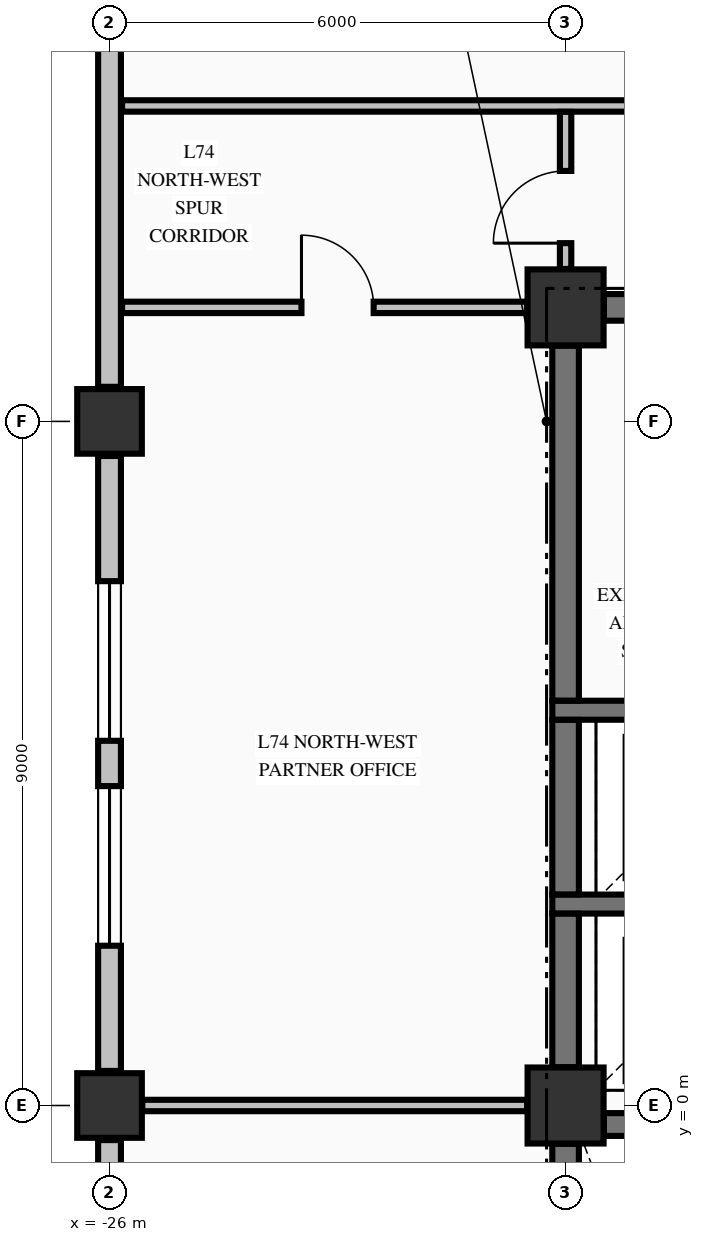
"""IFC4 building model, lengths in metres.
Left out: names, types, materials, properties, quantities, classifications, styles, units other than length and angle.
Written with IfcOpenShell. Run it as: python <this file> out.ifc"""

import sys

from ifc_helpers import new_model, si_unit, direction, frame, frame_2d, origin, origin_2d, place, context, subcontext, project, spatial, rectangle, extrude, element, fill, save


model = new_model("IFC4")
c1 = context("Model", 3, precision=1e-05, world=origin(), true_north=direction((0.0, 1.0)))
c2 = subcontext(c1, "Body", "Model", "MODEL_VIEW")
j1 = project(units=[si_unit("LENGTHUNIT", "METRE"), si_unit("PLANEANGLEUNIT", "RADIAN")], contexts=[c1])
p1 = place(None, origin())
s1 = spatial("IfcSite", under=j1, at=p1, CompositionType="ELEMENT")
p2 = place(p1, origin())
s2 = spatial("IfcBuilding", under=s1, at=p2, CompositionType="ELEMENT")
p3 = place(p2, frame((0.0, 0.0, 278.06)))
s3 = spatial("IfcBuildingStorey", under=s2, at=p3, CompositionType="ELEMENT", Elevation=278.06)
for number, where, z_axis, x_axis in (
    (1, (-26.0, 0.0, -0.425), (0.0, 0.0, 1.0), (1.0, 0.0, 0.0)),
    (2, (-26.0, 9.0, -0.425), (0.0, 0.0, 1.0), (1.0, 0.0, 0.0)),
):
    element("IfcColumn", number, at=place(p3, frame(where, z_axis=z_axis, x_axis=x_axis)), inside=s3, PredefinedType="COLUMN", context=c2, shape_type="SweptSolid", body=[
        extrude(rectangle(XDim=0.85, YDim=0.85, at=origin_2d()), origin(), (0.0, 0.0, 1.0), 3.84),
    ])
for number, where, z_axis, x_axis in (
    (3, (-20.0, 10.5, -0.425), (0.0, 0.0, 1.0), (1.0, 0.0, 0.0)),
    (4, (-20.0, 0.0, -0.425), (0.0, 0.0, 1.0), (1.0, 0.0, 0.0)),
):
    element("IfcColumn", number, at=place(p3, frame(where, z_axis=z_axis, x_axis=x_axis)), inside=s3, PredefinedType="COLUMN", context=c2, shape_type="SweptSolid", body=[
        extrude(rectangle(XDim=1.0, YDim=1.0, at=origin_2d()), origin(), (0.0, 0.0, 1.0), 3.84),
    ])
p4 = place(p3, frame((-26.0, -0.455, 0.0), z_axis=(0.0, 0.0, 1.0), x_axis=(0.0, -1.0, 0.0)))
e5 = element("IfcWall", 5, at=p4, inside=s3, PredefinedType="STANDARD", context=c2, shape_type="SweptSolid", body=[
    extrude(rectangle(XDim=8.09, YDim=0.3, at=frame_2d((4.045, 0.0))), origin(), (0.0, 0.0, 1.0), 2.807),
])
p5 = place(p4, frame((1.647, 0.0, 0.7)))
e6 = element("IfcOpeningElement", 6, at=p5, cuts=e5, PredefinedType="OPENING", context=c2, shape_type="SweptSolid", body=[
    extrude(rectangle(XDim=2.1, YDim=1.5, at=frame_2d((1.05, 0.75))), frame((0.0, 0.16, 0.0), z_axis=(0.0, -1.0, 0.0), x_axis=(1.0, 0.0, 0.0)), (0.0, 0.0, 1.0), 0.32),
])
p6 = place(p4, frame((4.343, 0.0, 0.7)))
e7 = element("IfcOpeningElement", 7, at=p6, cuts=e5, PredefinedType="OPENING", context=c2, shape_type="SweptSolid", body=[
    extrude(rectangle(XDim=2.1, YDim=1.5, at=frame_2d((1.05, 0.75))), frame((0.0, 0.16, 0.0), z_axis=(0.0, -1.0, 0.0), x_axis=(1.0, 0.0, 0.0)), (0.0, 0.0, 1.0), 0.32),
])
p7 = place(p3, frame((-26.0, 8.545, 0.0), z_axis=(0.0, 0.0, 1.0), x_axis=(0.0, -1.0, 0.0)))
e8 = element("IfcWall", 8, at=p7, inside=s3, PredefinedType="STANDARD", context=c2, shape_type="SweptSolid", body=[
    extrude(rectangle(XDim=8.09, YDim=0.3, at=frame_2d((4.045, 0.0))), origin(), (0.0, 0.0, 1.0), 2.807),
])
p8 = place(p7, frame((1.647, 0.0, 0.7)))
e9 = element("IfcOpeningElement", 9, at=p8, cuts=e8, PredefinedType="OPENING", context=c2, shape_type="SweptSolid", body=[
    extrude(rectangle(XDim=2.1, YDim=1.5, at=frame_2d((1.05, 0.75))), frame((0.0, 0.16, 0.0), z_axis=(0.0, -1.0, 0.0), x_axis=(1.0, 0.0, 0.0)), (0.0, 0.0, 1.0), 0.32),
])
p9 = place(p7, frame((4.343, 0.0, 0.7)))
e10 = element("IfcOpeningElement", 10, at=p9, cuts=e8, PredefinedType="OPENING", context=c2, shape_type="SweptSolid", body=[
    extrude(rectangle(XDim=2.1, YDim=1.5, at=frame_2d((1.05, 0.75))), frame((0.0, 0.16, 0.0), z_axis=(0.0, -1.0, 0.0), x_axis=(1.0, 0.0, 0.0)), (0.0, 0.0, 1.0), 0.32),
])
p10 = place(p3, frame((-26.0, 17.545, 0.0), z_axis=(0.0, 0.0, 1.0), x_axis=(0.0, -1.0, 0.0)))
e11 = element("IfcWall", 11, at=p10, inside=s3, PredefinedType="STANDARD", context=c2, shape_type="SweptSolid", body=[
    extrude(rectangle(XDim=8.09, YDim=0.3, at=frame_2d((4.045, 0.0))), origin(), (0.0, 0.0, 1.0), 1.607),
])
p11 = place(p3, frame((-19.496, -0.25, 0.0), z_axis=(0.0, 0.0, 1.0), x_axis=(1.0, 0.0, 0.0)))
e12 = element("IfcWall", 12, at=p11, inside=s3, PredefinedType="SHEAR", context=c2, shape_type="SweptSolid", body=[
    extrude(rectangle(XDim=7.992, YDim=0.3, at=frame_2d((3.996, 0.0))), origin(), (0.0, 0.0, 1.0), 3.415),
])
p12 = place(p11, frame((5.796, 0.0, 0.0)))
e13 = element("IfcOpeningElement", 13, at=p12, cuts=e12, PredefinedType="OPENING", context=c2, shape_type="SweptSolid", body=[
    extrude(rectangle(XDim=1.1, YDim=2.15, at=frame_2d((0.55, 1.075))), frame((0.0, 0.16, 0.0), z_axis=(0.0, -1.0, 0.0), x_axis=(1.0, 0.0, 0.0)), (0.0, 0.0, 1.0), 0.32),
])
for number, where, z_axis, x_axis in (
    (14, (-20.175, 2.65, 0.0), (0.0, 0.0, 1.0), (1.0, 0.0, 0.0)),
    (15, (-20.175, 5.2, 0.0), (0.0, 0.0, 1.0), (1.0, 0.0, 0.0)),
):
    element("IfcWall", number, at=place(p3, frame(where, z_axis=z_axis, x_axis=x_axis)), inside=s3, PredefinedType="SOLIDWALL", context=c2, shape_type="SweptSolid", body=[
        extrude(rectangle(XDim=3.2, YDim=0.25, at=frame_2d((1.6, 0.0))), origin(), (0.0, 0.0, 1.0), 3.415),
    ])
p13 = place(p3, frame((-19.496, 10.5, 0.0), z_axis=(0.0, 0.0, 1.0), x_axis=(1.0, 0.0, 0.0)))
e16 = element("IfcWall", 16, at=p13, inside=s3, PredefinedType="SHEAR", context=c2, shape_type="SweptSolid", body=[
    extrude(rectangle(XDim=4.796, YDim=0.35, at=frame_2d((2.398, 0.0))), origin(), (0.0, 0.0, 1.0), 3.415),
])
p14 = place(p13, frame((3.046, 0.0, 0.0)))
e17 = element("IfcOpeningElement", 17, at=p14, cuts=e16, PredefinedType="OPENING", context=c2, shape_type="SweptSolid", body=[
    extrude(rectangle(XDim=1.1, YDim=2.15, at=frame_2d((0.55, 1.075))), frame((0.0, 0.185, 0.0), z_axis=(0.0, -1.0, 0.0), x_axis=(1.0, 0.0, 0.0)), (0.0, 0.0, 1.0), 0.37),
])
p15 = place(p3, frame((-25.569, 0.0, 0.0), z_axis=(0.0, 0.0, 1.0), x_axis=(1.0, 0.0, 0.0)))
e18 = element("IfcWall", 18, at=p15, inside=s3, PredefinedType="PARTITIONING", context=c2, shape_type="SweptSolid", body=[
    extrude(rectangle(XDim=5.063, YDim=0.15, at=frame_2d((2.531, 0.0))), origin(), (0.0, 0.0, 1.0), 3.005),
])
p16 = place(p3, frame((-25.835, 10.5, 0.0), z_axis=(0.0, 0.0, 1.0), x_axis=(1.0, 0.0, 0.0)))
e19 = element("IfcWall", 19, at=p16, inside=s3, PredefinedType="PARTITIONING", context=c2, shape_type="SweptSolid", body=[
    extrude(rectangle(XDim=5.329, YDim=0.15, at=frame_2d((2.665, 0.0))), origin(), (0.0, 0.0, 1.0), 3.415),
])
p17 = place(p16, frame((2.36, 0.0, 0.0)))
e20 = element("IfcOpeningElement", 20, at=p17, cuts=e19, PredefinedType="OPENING", context=c2, shape_type="SweptSolid", body=[
    extrude(rectangle(XDim=0.95, YDim=2.15, at=frame_2d((0.475, 1.075))), frame((0.0, 0.085, 0.0), z_axis=(0.0, -1.0, 0.0), x_axis=(1.0, 0.0, 0.0)), (0.0, 0.0, 1.0), 0.17),
])
p18 = place(p3, frame((-25.835, 13.15, 0.0), z_axis=(0.0, 0.0, 1.0), x_axis=(1.0, 0.0, 0.0)))
e21 = element("IfcWall", 21, at=p18, inside=s3, PredefinedType="PARTITIONING", context=c2, shape_type="SweptSolid", body=[
    extrude(rectangle(XDim=45.91, YDim=0.15, at=frame_2d((22.955, 0.0))), origin(), (0.0, 0.0, 1.0), 3.415),
])
p19 = place(p18, frame((7.74, 0.0, 0.0)))
e22 = element("IfcOpeningElement", 22, at=p19, cuts=e21, PredefinedType="OPENING", context=c2, shape_type="SweptSolid", body=[
    extrude(rectangle(XDim=0.95, YDim=2.15, at=frame_2d((0.475, 1.075))), frame((0.0, 0.085, 0.0), z_axis=(0.0, -1.0, 0.0), x_axis=(1.0, 0.0, 0.0)), (0.0, 0.0, 1.0), 0.17),
])
p20 = place(p18, frame((12.98, 0.0, 0.0)))
e23 = element("IfcOpeningElement", 23, at=p20, cuts=e21, PredefinedType="OPENING", context=c2, shape_type="SweptSolid", body=[
    extrude(rectangle(XDim=0.95, YDim=2.15, at=frame_2d((0.475, 1.075))), frame((0.0, 0.085, 0.0), z_axis=(0.0, -1.0, 0.0), x_axis=(1.0, 0.0, 0.0)), (0.0, 0.0, 1.0), 0.17),
])
p21 = place(p18, frame((19.21, 0.0, 0.0)))
e24 = element("IfcOpeningElement", 24, at=p21, cuts=e21, PredefinedType="OPENING", context=c2, shape_type="SweptSolid", body=[
    extrude(rectangle(XDim=0.95, YDim=2.15, at=frame_2d((0.475, 1.075))), frame((0.0, 0.085, 0.0), z_axis=(0.0, -1.0, 0.0), x_axis=(1.0, 0.0, 0.0)), (0.0, 0.0, 1.0), 0.17),
])
p22 = place(p18, frame((24.16, 0.0, 0.0)))
e25 = element("IfcOpeningElement", 25, at=p22, cuts=e21, PredefinedType="OPENING", context=c2, shape_type="SweptSolid", body=[
    extrude(rectangle(XDim=0.95, YDim=2.15, at=frame_2d((0.475, 1.075))), frame((0.0, 0.085, 0.0), z_axis=(0.0, -1.0, 0.0), x_axis=(1.0, 0.0, 0.0)), (0.0, 0.0, 1.0), 0.17),
])
p23 = place(p18, frame((39.16, 0.0, 0.0)))
e26 = element("IfcOpeningElement", 26, at=p23, cuts=e21, PredefinedType="OPENING", context=c2, shape_type="SweptSolid", body=[
    extrude(rectangle(XDim=1.05, YDim=2.15, at=frame_2d((0.525, 1.075))), frame((0.0, 0.085, 0.0), z_axis=(0.0, -1.0, 0.0), x_axis=(1.0, 0.0, 0.0)), (0.0, 0.0, 1.0), 0.17),
])
p24 = place(p3, frame((-20.0, -9.446, 0.0), z_axis=(0.0, 0.0, 1.0), x_axis=(0.0, 1.0, 0.0)))
e27 = element("IfcWall", 27, at=p24, inside=s3, PredefinedType="SHEAR", context=c2, shape_type="SweptSolid", body=[
    extrude(rectangle(XDim=8.942, YDim=0.35, at=frame_2d((4.471, 0.0))), origin(), (0.0, 0.0, 1.0), 3.415),
])
p25 = place(p3, frame((-20.0, 0.504, 0.0), z_axis=(0.0, 0.0, 1.0), x_axis=(0.0, 1.0, 0.0)))
e28 = element("IfcWall", 28, at=p25, inside=s3, PredefinedType="SHEAR", context=c2, shape_type="SweptSolid", body=[
    extrude(rectangle(XDim=2.019, YDim=0.35, at=frame_2d((1.01, 0.0))), origin(), (0.0, 0.0, 1.0), 3.415),
])
p26 = place(p3, frame((-20.0, 2.777, 0.0), z_axis=(0.0, 0.0, 1.0), x_axis=(0.0, 1.0, 0.0)))
e29 = element("IfcWall", 29, at=p26, inside=s3, PredefinedType="SHEAR", context=c2, shape_type="SweptSolid", body=[
    extrude(rectangle(XDim=2.296, YDim=0.35, at=frame_2d((1.148, 0.0))), origin(), (0.0, 0.0, 1.0), 3.415),
])
p27 = place(p3, frame((-20.0, 5.327, 0.0), z_axis=(0.0, 0.0, 1.0), x_axis=(0.0, 1.0, 0.0)))
e30 = element("IfcWall", 30, at=p27, inside=s3, PredefinedType="SHEAR", context=c2, shape_type="SweptSolid", body=[
    extrude(rectangle(XDim=4.669, YDim=0.35, at=frame_2d((2.334, 0.0))), origin(), (0.0, 0.0, 1.0), 3.415),
])
p28 = place(p3, frame((-20.0, 11.006, 0.0), z_axis=(0.0, 0.0, 1.0), x_axis=(0.0, 1.0, 0.0)))
e31 = element("IfcWall", 31, at=p28, inside=s3, PredefinedType="PARTITIONING", context=c2, shape_type="SweptSolid", body=[
    extrude(rectangle(XDim=2.066, YDim=0.15, at=frame_2d((1.033, 0.0))), origin(), (0.0, 0.0, 1.0), 3.415),
])
p29 = place(p28, frame((0.339, 0.0, 0.0)))
e32 = element("IfcOpeningElement", 32, at=p29, cuts=e31, PredefinedType="OPENING", context=c2, shape_type="SweptSolid", body=[
    extrude(rectangle(XDim=0.95, YDim=2.15, at=frame_2d((0.475, 1.075))), frame((0.0, 0.085, 0.0), z_axis=(0.0, -1.0, 0.0), x_axis=(1.0, 0.0, 0.0)), (0.0, 0.0, 1.0), 0.17),
])
p30 = place(p8, origin())
e33 = element("IfcWindow", 33, at=p30, inside=s3, PartitioningType="SINGLE_PANEL", PredefinedType="WINDOW", context=c2, shape_type="SweptSolid", body=[
    extrude(rectangle(XDim=2.1, YDim=1.5, at=frame_2d((1.05, 0.75))), frame((0.0, 0.03, 0.0), z_axis=(0.0, -1.0, 0.0), x_axis=(1.0, 0.0, 0.0)), (0.0, 0.0, 1.0), 0.06),
])
fill(e9, e33)
p31 = place(p9, origin())
e34 = element("IfcWindow", 34, at=p31, inside=s3, PartitioningType="SINGLE_PANEL", PredefinedType="WINDOW", context=c2, shape_type="SweptSolid", body=[
    extrude(rectangle(XDim=2.1, YDim=1.5, at=frame_2d((1.05, 0.75))), frame((0.0, 0.03, 0.0), z_axis=(0.0, -1.0, 0.0), x_axis=(1.0, 0.0, 0.0)), (0.0, 0.0, 1.0), 0.06),
])
fill(e10, e34)
p32 = place(p29, origin())
e35 = element("IfcDoor", 35, at=p32, inside=s3, OperationType="SINGLE_SWING_LEFT", PredefinedType="DOOR", context=c2, shape_type="SweptSolid", body=[
    extrude(rectangle(XDim=0.95, YDim=2.15, at=frame_2d((0.475, 1.075))), frame((0.0, 0.025, 0.0), z_axis=(0.0, -1.0, 0.0), x_axis=(1.0, 0.0, 0.0)), (0.0, 0.0, 1.0), 0.05),
])
fill(e32, e35)
p33 = place(p17, origin())
e36 = element("IfcDoor", 36, at=p33, inside=s3, OperationType="SINGLE_SWING_LEFT", PredefinedType="DOOR", context=c2, shape_type="SweptSolid", body=[
    extrude(rectangle(XDim=0.95, YDim=2.15, at=frame_2d((0.475, 1.075))), frame((0.0, 0.025, 0.0), z_axis=(0.0, -1.0, 0.0), x_axis=(1.0, 0.0, 0.0)), (0.0, 0.0, 1.0), 0.05),
])
fill(e20, e36)
save(model, sys.argv[1])
